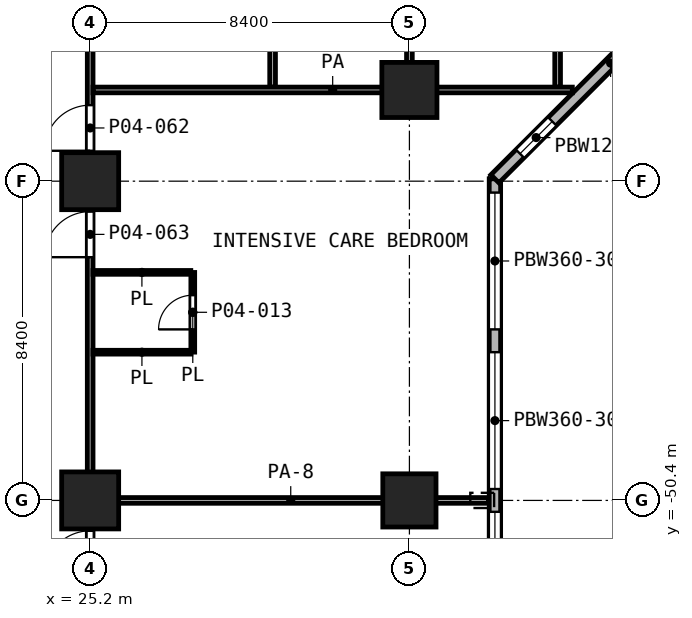
"""IFC4 building model, lengths in metres.
Left out: names, types, materials, properties, quantities, classifications, styles, units other than length and angle.
Written with IfcOpenShell. Run it as: python <this file> out.ifc"""

import sys

from ifc_helpers import new_model, si_unit, direction, frame, frame_2d, origin, origin_2d, place, context, subcontext, project, spatial, rectangle, extrude, element, fill, save


model = new_model("IFC4")
c1 = context("Model", 3, precision=1e-05, world=origin(), true_north=direction((0.0, 1.0)))
c2 = subcontext(c1, "Body", "Model", "MODEL_VIEW")
j1 = project(units=[si_unit("LENGTHUNIT", "METRE"), si_unit("PLANEANGLEUNIT", "RADIAN")], contexts=[c1])
p1 = place(None, origin())
s1 = spatial("IfcSite", under=j1, at=p1, CompositionType="ELEMENT")
p2 = place(p1, origin())
s2 = spatial("IfcBuilding", under=s1, at=p2, CompositionType="ELEMENT")
p3 = place(p2, frame((0.0, 0.0, 18.2)))
s3 = spatial("IfcBuildingStorey", under=s2, at=p3, CompositionType="ELEMENT", Elevation=18.2)
p4 = place(p3, frame((33.6, -39.6, 0.0), z_axis=(0.0, 0.0, 1.0), x_axis=(1.0, 0.0, 0.0)))
e1 = element("IfcColumn", 1, at=p4, inside=s3, PredefinedType="COLUMN", context=c2, shape_type="SweptSolid", body=[
    extrude(rectangle(XDim=1.45, YDim=1.45, at=origin_2d()), origin(), (0.0, 0.0, 1.0), 5.6),
])
for number, where, z_axis, x_axis in (
    (2, (25.2, -42.0, 0.0), (0.0, 0.0, 1.0), (1.0, 0.0, 0.0)),
    (3, (25.2, -50.4, 0.0), (0.0, 0.0, 1.0), (1.0, 0.0, 0.0)),
):
    element("IfcColumn", number, at=place(p3, frame(where, z_axis=z_axis, x_axis=x_axis)), inside=s3, PredefinedType="COLUMN", context=c2, shape_type="SweptSolid", body=[
        extrude(rectangle(XDim=1.5, YDim=1.5, at=origin_2d()), origin(), (0.0, 0.0, 1.0), 5.6),
    ])
p5 = place(p3, frame((33.6, -50.4, 0.0), z_axis=(0.0, 0.0, 1.0), x_axis=(1.0, 0.0, 0.0)))
e4 = element("IfcColumn", 4, at=p5, inside=s3, PredefinedType="COLUMN", context=c2, shape_type="SweptSolid", body=[
    extrude(rectangle(XDim=1.4, YDim=1.4, at=origin_2d()), origin(), (0.0, 0.0, 1.0), 5.6),
])
p6 = place(p3, frame((35.85, -80.338, 0.0), z_axis=(0.0, 0.0, 1.0), x_axis=(0.0, 1.0, 0.0)))
e5 = element("IfcWall", 5, at=p6, inside=s3, PredefinedType="SOLIDWALL", context=c2, shape_type="SweptSolid", body=[
    extrude(rectangle(XDim=38.4, YDim=0.3, at=frame_2d((19.2, 0.0))), origin(), (0.0, 0.0, 1.0), 5.05),
])
p7 = place(p6, frame((1.513, 0.0, 0.9)))
e6 = element("IfcOpeningElement", 6, at=p7, cuts=e5, PredefinedType="OPENING", context=c2, shape_type="SweptSolid", body=[
    extrude(rectangle(XDim=2.4, YDim=3.0, at=frame_2d((1.2, 1.5))), frame((0.0, 0.16, 0.0), z_axis=(0.0, -1.0, 0.0), x_axis=(1.0, 0.0, 0.0)), (0.0, 0.0, 1.0), 0.32),
])
p8 = place(p6, frame((5.038, 0.0, 0.9)))
e7 = element("IfcOpeningElement", 7, at=p8, cuts=e5, PredefinedType="OPENING", context=c2, shape_type="SweptSolid", body=[
    extrude(rectangle(XDim=3.6, YDim=3.0, at=frame_2d((1.8, 1.5))), frame((0.0, 0.16, 0.0), z_axis=(0.0, -1.0, 0.0), x_axis=(1.0, 0.0, 0.0)), (0.0, 0.0, 1.0), 0.32),
])
p9 = place(p6, frame((9.238, 0.0, 0.9)))
e8 = element("IfcOpeningElement", 8, at=p9, cuts=e5, PredefinedType="OPENING", context=c2, shape_type="SweptSolid", body=[
    extrude(rectangle(XDim=3.6, YDim=3.0, at=frame_2d((1.8, 1.5))), frame((0.0, 0.16, 0.0), z_axis=(0.0, -1.0, 0.0), x_axis=(1.0, 0.0, 0.0)), (0.0, 0.0, 1.0), 0.32),
])
p10 = place(p6, frame((13.438, 0.0, 0.9)))
e9 = element("IfcOpeningElement", 9, at=p10, cuts=e5, PredefinedType="OPENING", context=c2, shape_type="SweptSolid", body=[
    extrude(rectangle(XDim=3.6, YDim=3.0, at=frame_2d((1.8, 1.5))), frame((0.0, 0.16, 0.0), z_axis=(0.0, -1.0, 0.0), x_axis=(1.0, 0.0, 0.0)), (0.0, 0.0, 1.0), 0.32),
])
p11 = place(p6, frame((17.638, 0.0, 0.9)))
e10 = element("IfcOpeningElement", 10, at=p11, cuts=e5, PredefinedType="OPENING", context=c2, shape_type="SweptSolid", body=[
    extrude(rectangle(XDim=3.6, YDim=3.0, at=frame_2d((1.8, 1.5))), frame((0.0, 0.16, 0.0), z_axis=(0.0, -1.0, 0.0), x_axis=(1.0, 0.0, 0.0)), (0.0, 0.0, 1.0), 0.32),
])
p12 = place(p6, frame((21.838, 0.0, 0.9)))
e11 = element("IfcOpeningElement", 11, at=p12, cuts=e5, PredefinedType="OPENING", context=c2, shape_type="SweptSolid", body=[
    extrude(rectangle(XDim=3.6, YDim=3.0, at=frame_2d((1.8, 1.5))), frame((0.0, 0.16, 0.0), z_axis=(0.0, -1.0, 0.0), x_axis=(1.0, 0.0, 0.0)), (0.0, 0.0, 1.0), 0.32),
])
p13 = place(p6, frame((26.038, 0.0, 0.9)))
e12 = element("IfcOpeningElement", 12, at=p13, cuts=e5, PredefinedType="OPENING", context=c2, shape_type="SweptSolid", body=[
    extrude(rectangle(XDim=3.6, YDim=3.0, at=frame_2d((1.8, 1.5))), frame((0.0, 0.16, 0.0), z_axis=(0.0, -1.0, 0.0), x_axis=(1.0, 0.0, 0.0)), (0.0, 0.0, 1.0), 0.32),
])
p14 = place(p6, frame((30.238, 0.0, 0.9)))
e13 = element("IfcOpeningElement", 13, at=p14, cuts=e5, PredefinedType="OPENING", context=c2, shape_type="SweptSolid", body=[
    extrude(rectangle(XDim=3.6, YDim=3.0, at=frame_2d((1.8, 1.5))), frame((0.0, 0.16, 0.0), z_axis=(0.0, -1.0, 0.0), x_axis=(1.0, 0.0, 0.0)), (0.0, 0.0, 1.0), 0.32),
])
p15 = place(p6, frame((34.438, 0.0, 0.9)))
e14 = element("IfcOpeningElement", 14, at=p15, cuts=e5, PredefinedType="OPENING", context=c2, shape_type="SweptSolid", body=[
    extrude(rectangle(XDim=3.6, YDim=3.0, at=frame_2d((1.8, 1.5))), frame((0.0, 0.16, 0.0), z_axis=(0.0, -1.0, 0.0), x_axis=(1.0, 0.0, 0.0)), (0.0, 0.0, 1.0), 0.32),
])
p16 = place(p3, frame((35.85, -41.938, 0.0), z_axis=(0.0, 0.0, 1.0), x_axis=(0.707106781187, 0.707106781187, 0.0)))
e15 = element("IfcWall", 15, at=p16, inside=s3, PredefinedType="SOLIDWALL", context=c2, shape_type="SweptSolid", body=[
    extrude(rectangle(XDim=8.61, YDim=0.3, at=frame_2d((4.305, 0.0))), origin(), (0.0, 0.0, 1.0), 5.05),
])
p17 = place(p16, frame((0.934, 0.0, 0.9)))
e16 = element("IfcOpeningElement", 16, at=p17, cuts=e15, PredefinedType="OPENING", context=c2, shape_type="SweptSolid", body=[
    extrude(rectangle(XDim=1.2, YDim=3.0, at=frame_2d((0.6, 1.5))), frame((0.0, 0.16, 0.0), z_axis=(0.0, -1.0, 0.0), x_axis=(1.0, 0.0, 0.0)), (0.0, 0.0, 1.0), 0.32),
])
p18 = place(p16, frame((4.626, 0.0, 0.9)))
e17 = element("IfcOpeningElement", 17, at=p18, cuts=e15, PredefinedType="OPENING", context=c2, shape_type="SweptSolid", body=[
    extrude(rectangle(XDim=3.6, YDim=3.0, at=frame_2d((1.8, 1.5))), frame((0.0, 0.16, 0.0), z_axis=(0.0, -1.0, 0.0), x_axis=(1.0, 0.0, 0.0)), (0.0, 0.0, 1.0), 0.32),
])
p19 = place(p3, frame((25.275, -46.5, 0.0), z_axis=(0.0, 0.0, 1.0), x_axis=(1.0, 0.0, 0.0)))
e18 = element("IfcWall", 18, at=p19, inside=s3, PredefinedType="PARTITIONING", context=c2, shape_type="SweptSolid", body=[
    extrude(rectangle(XDim=2.574, YDim=0.1, at=frame_2d((1.287, 0.0))), origin(), (0.0, 0.0, 1.0), 5.05),
])
p20 = place(p3, frame((25.275, -44.4, 0.0), z_axis=(0.0, 0.0, 1.0), x_axis=(1.0, 0.0, 0.0)))
e19 = element("IfcWall", 19, at=p20, inside=s3, PredefinedType="PARTITIONING", context=c2, shape_type="SweptSolid", body=[
    extrude(rectangle(XDim=2.573, YDim=0.1, at=frame_2d((1.287, 0.0))), origin(), (0.0, 0.0, 1.0), 5.05),
])
p21 = place(p3, frame((27.9, -46.498, 0.0), z_axis=(0.0, 0.0, 1.0), x_axis=(0.0, 1.0, 0.0)))
e20 = element("IfcWall", 20, at=p21, inside=s3, PredefinedType="PARTITIONING", context=c2, shape_type="SweptSolid", body=[
    extrude(rectangle(XDim=2.096, YDim=0.1, at=frame_2d((1.048, 0.0))), origin(), (0.0, 0.0, 1.0), 5.05),
])
p22 = place(p21, frame((0.598, 0.0, 0.0)))
e21 = element("IfcOpeningElement", 21, at=p22, cuts=e20, PredefinedType="OPENING", context=c2, shape_type="SweptSolid", body=[
    extrude(rectangle(XDim=0.9, YDim=2.1, at=frame_2d((0.45, 1.05))), frame((0.0, 0.06, 0.0), z_axis=(0.0, -1.0, 0.0), x_axis=(1.0, 0.0, 0.0)), (0.0, 0.0, 1.0), 0.12),
])
p23 = place(p3, frame((25.275, -50.4, 0.0), z_axis=(0.0, 0.0, 1.0), x_axis=(1.0, 0.0, 0.0)))
e22 = element("IfcWall", 22, at=p23, inside=s3, PredefinedType="PARTITIONING", context=c2, shape_type="SweptSolid", body=[
    extrude(rectangle(XDim=10.405, YDim=0.15, at=frame_2d((5.203, 0.0))), origin(), (0.0, 0.0, 1.0), 4.15),
])
p24 = place(p3, frame((25.275, -39.6, 0.0), z_axis=(0.0, 0.0, 1.0), x_axis=(1.0, 0.0, 0.0)))
e23 = element("IfcWall", 23, at=p24, inside=s3, PredefinedType="PARTITIONING", context=c2, shape_type="SweptSolid", body=[
    extrude(rectangle(XDim=12.612, YDim=0.15, at=frame_2d((6.306, 0.0))), origin(), (0.0, 0.0, 1.0), 5.05),
])
p25 = place(p3, frame((25.2, -81.3, 0.0), z_axis=(0.0, 0.0, 1.0), x_axis=(0.0, 1.0, 0.0)))
e24 = element("IfcWall", 24, at=p25, inside=s3, PredefinedType="PARTITIONING", context=c2, shape_type="SweptSolid", body=[
    extrude(rectangle(XDim=56.1, YDim=0.15, at=frame_2d((28.05, 0.0))), origin(), (0.0, 0.0, 1.0), 5.05),
])
p26 = place(p25, frame((48.5, 0.0, 0.0)))
e25 = element("IfcOpeningElement", 25, at=p26, cuts=e24, PredefinedType="OPENING", context=c2, shape_type="SweptSolid", body=[
    extrude(rectangle(XDim=1.2, YDim=2.1, at=frame_2d((0.6, 1.05))), frame((0.0, 0.085, 0.0), z_axis=(0.0, -1.0, 0.0), x_axis=(1.0, 0.0, 0.0)), (0.0, 0.0, 1.0), 0.17),
])
p27 = place(p25, frame((40.1, 0.0, 0.0)))
e26 = element("IfcOpeningElement", 26, at=p27, cuts=e24, PredefinedType="OPENING", context=c2, shape_type="SweptSolid", body=[
    extrude(rectangle(XDim=1.2, YDim=2.1, at=frame_2d((0.6, 1.05))), frame((0.0, 0.085, 0.0), z_axis=(0.0, -1.0, 0.0), x_axis=(1.0, 0.0, 0.0)), (0.0, 0.0, 1.0), 0.17),
])
p28 = place(p25, frame((37.3, 0.0, 0.0)))
e27 = element("IfcOpeningElement", 27, at=p28, cuts=e24, PredefinedType="OPENING", context=c2, shape_type="SweptSolid", body=[
    extrude(rectangle(XDim=1.2, YDim=2.1, at=frame_2d((0.6, 1.05))), frame((0.0, 0.085, 0.0), z_axis=(0.0, -1.0, 0.0), x_axis=(1.0, 0.0, 0.0)), (0.0, 0.0, 1.0), 0.17),
])
p29 = place(p25, frame((28.9, 0.0, 0.0)))
e28 = element("IfcOpeningElement", 28, at=p29, cuts=e24, PredefinedType="OPENING", context=c2, shape_type="SweptSolid", body=[
    extrude(rectangle(XDim=1.2, YDim=2.1, at=frame_2d((0.6, 1.05))), frame((0.0, 0.085, 0.0), z_axis=(0.0, -1.0, 0.0), x_axis=(1.0, 0.0, 0.0)), (0.0, 0.0, 1.0), 0.17),
])
p30 = place(p25, frame((23.3, 0.0, 0.0)))
e29 = element("IfcOpeningElement", 29, at=p30, cuts=e24, PredefinedType="OPENING", context=c2, shape_type="SweptSolid", body=[
    extrude(rectangle(XDim=1.2, YDim=2.1, at=frame_2d((0.6, 1.05))), frame((0.0, 0.085, 0.0), z_axis=(0.0, -1.0, 0.0), x_axis=(1.0, 0.0, 0.0)), (0.0, 0.0, 1.0), 0.17),
])
p31 = place(p25, frame((20.6, 0.0, 0.0)))
e30 = element("IfcOpeningElement", 30, at=p31, cuts=e24, PredefinedType="OPENING", context=c2, shape_type="SweptSolid", body=[
    extrude(rectangle(XDim=1.1, YDim=2.1, at=frame_2d((0.55, 1.05))), frame((0.0, 0.085, 0.0), z_axis=(0.0, -1.0, 0.0), x_axis=(1.0, 0.0, 0.0)), (0.0, 0.0, 1.0), 0.17),
])
p32 = place(p25, frame((14.9, 0.0, 0.0)))
e31 = element("IfcOpeningElement", 31, at=p32, cuts=e24, PredefinedType="OPENING", context=c2, shape_type="SweptSolid", body=[
    extrude(rectangle(XDim=1.1, YDim=2.1, at=frame_2d((0.55, 1.05))), frame((0.0, 0.085, 0.0), z_axis=(0.0, -1.0, 0.0), x_axis=(1.0, 0.0, 0.0)), (0.0, 0.0, 1.0), 0.17),
])
p33 = place(p25, frame((7.5, 0.0, 0.0)))
e32 = element("IfcOpeningElement", 32, at=p33, cuts=e24, PredefinedType="OPENING", context=c2, shape_type="SweptSolid", body=[
    extrude(rectangle(XDim=1.2, YDim=2.1, at=frame_2d((0.6, 1.05))), frame((0.0, 0.085, 0.0), z_axis=(0.0, -1.0, 0.0), x_axis=(1.0, 0.0, 0.0)), (0.0, 0.0, 1.0), 0.17),
])
p34 = place(p25, frame((11.7, 0.0, 0.0)))
e33 = element("IfcOpeningElement", 33, at=p34, cuts=e24, PredefinedType="OPENING", context=c2, shape_type="SweptSolid", body=[
    extrude(rectangle(XDim=1.2, YDim=2.1, at=frame_2d((0.6, 1.05))), frame((0.0, 0.085, 0.0), z_axis=(0.0, -1.0, 0.0), x_axis=(1.0, 0.0, 0.0)), (0.0, 0.0, 1.0), 0.17),
])
p35 = place(p25, frame((3.15, 0.0, 0.0)))
e34 = element("IfcOpeningElement", 34, at=p35, cuts=e24, PredefinedType="OPENING", context=c2, shape_type="SweptSolid", body=[
    extrude(rectangle(XDim=1.2, YDim=2.1, at=frame_2d((0.6, 1.05))), frame((0.0, 0.085, 0.0), z_axis=(0.0, -1.0, 0.0), x_axis=(1.0, 0.0, 0.0)), (0.0, 0.0, 1.0), 0.17),
])
for number, where, z_axis, x_axis in (
    (35, (30.0, -39.525, 0.0), (0.0, 0.0, 1.0), (0.0, 1.0, 0.0)),
    (36, (33.6, -39.525, 0.0), (0.0, 0.0, 1.0), (0.0, 1.0, 0.0)),
):
    element("IfcWall", number, at=place(p3, frame(where, z_axis=z_axis, x_axis=x_axis)), inside=s3, PredefinedType="PARTITIONING", context=c2, shape_type="SweptSolid", body=[
        extrude(rectangle(XDim=14.25, YDim=0.15, at=frame_2d((7.125, 0.0))), origin(), (0.0, 0.0, 1.0), 5.05),
    ])
p36 = place(p3, frame((37.5, -39.525, 0.0), z_axis=(0.0, 0.0, 1.0), x_axis=(0.0, 1.0, 0.0)))
e37 = element("IfcWall", 37, at=p36, inside=s3, PredefinedType="PARTITIONING", context=c2, shape_type="SweptSolid", body=[
    extrude(rectangle(XDim=14.25, YDim=0.15, at=frame_2d((7.125, 0.0))), origin(), (0.0, 0.0, 1.0), 3.65),
])
p37 = place(p13, origin())
e38 = element("IfcWindow", 38, at=p37, inside=s3, PartitioningType="SINGLE_PANEL", PredefinedType="WINDOW", context=c2, shape_type="SweptSolid", body=[
    extrude(rectangle(XDim=3.6, YDim=3.0, at=frame_2d((1.8, 1.5))), frame((0.0, 0.03, 0.0), z_axis=(0.0, -1.0, 0.0), x_axis=(1.0, 0.0, 0.0)), (0.0, 0.0, 1.0), 0.06),
])
fill(e12, e38)
p38 = place(p14, origin())
e39 = element("IfcWindow", 39, at=p38, inside=s3, PartitioningType="SINGLE_PANEL", PredefinedType="WINDOW", context=c2, shape_type="SweptSolid", body=[
    extrude(rectangle(XDim=3.6, YDim=3.0, at=frame_2d((1.8, 1.5))), frame((0.0, 0.03, 0.0), z_axis=(0.0, -1.0, 0.0), x_axis=(1.0, 0.0, 0.0)), (0.0, 0.0, 1.0), 0.06),
])
fill(e13, e39)
p39 = place(p15, origin())
e40 = element("IfcWindow", 40, at=p39, inside=s3, PartitioningType="SINGLE_PANEL", PredefinedType="WINDOW", context=c2, shape_type="SweptSolid", body=[
    extrude(rectangle(XDim=3.6, YDim=3.0, at=frame_2d((1.8, 1.5))), frame((0.0, 0.03, 0.0), z_axis=(0.0, -1.0, 0.0), x_axis=(1.0, 0.0, 0.0)), (0.0, 0.0, 1.0), 0.06),
])
fill(e14, e40)
p40 = place(p17, origin())
e41 = element("IfcWindow", 41, at=p40, inside=s3, PartitioningType="SINGLE_PANEL", PredefinedType="WINDOW", context=c2, shape_type="SweptSolid", body=[
    extrude(rectangle(XDim=1.2, YDim=3.0, at=frame_2d((0.6, 1.5))), frame((0.0, 0.03, 0.0), z_axis=(0.0, -1.0, 0.0), x_axis=(1.0, 0.0, 0.0)), (0.0, 0.0, 1.0), 0.06),
])
fill(e16, e41)
p41 = place(p27, origin())
e42 = element("IfcDoor", 42, at=p41, inside=s3, OperationType="SINGLE_SWING_LEFT", PredefinedType="DOOR", context=c2, shape_type="SweptSolid", body=[
    extrude(rectangle(XDim=1.2, YDim=2.1, at=frame_2d((0.6, 1.05))), frame((0.0, 0.025, 0.0), z_axis=(0.0, -1.0, 0.0), x_axis=(1.0, 0.0, 0.0)), (0.0, 0.0, 1.0), 0.05),
])
fill(e26, e42)
p42 = place(p28, origin())
e43 = element("IfcDoor", 43, at=p42, inside=s3, OperationType="SINGLE_SWING_LEFT", PredefinedType="DOOR", context=c2, shape_type="SweptSolid", body=[
    extrude(rectangle(XDim=1.2, YDim=2.1, at=frame_2d((0.6, 1.05))), frame((0.0, 0.025, 0.0), z_axis=(0.0, -1.0, 0.0), x_axis=(1.0, 0.0, 0.0)), (0.0, 0.0, 1.0), 0.05),
])
fill(e27, e43)
p43 = place(p22, origin())
e44 = element("IfcDoor", 44, at=p43, inside=s3, OperationType="SINGLE_SWING_LEFT", PredefinedType="DOOR", context=c2, shape_type="SweptSolid", body=[
    extrude(rectangle(XDim=0.9, YDim=2.1, at=frame_2d((0.45, 1.05))), frame((0.0, 0.025, 0.0), z_axis=(0.0, -1.0, 0.0), x_axis=(1.0, 0.0, 0.0)), (0.0, 0.0, 1.0), 0.05),
])
fill(e21, e44)
p44 = place(p29, origin())
e45 = element("IfcDoor", 45, at=p44, inside=s3, OperationType="SINGLE_SWING_LEFT", PredefinedType="DOOR", context=c2, shape_type="SweptSolid", body=[
    extrude(rectangle(XDim=1.2, YDim=2.1, at=frame_2d((0.6, 1.05))), frame((0.0, 0.025, 0.0), z_axis=(0.0, -1.0, 0.0), x_axis=(1.0, 0.0, 0.0)), (0.0, 0.0, 1.0), 0.05),
])
fill(e28, e45)
save(model, sys.argv[1])
